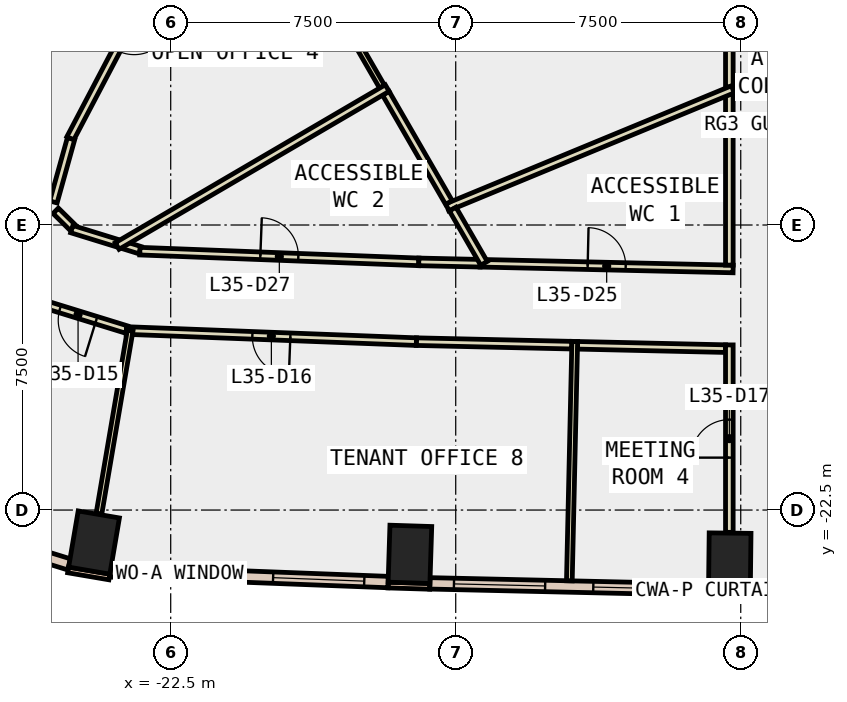
"""IFC4 building model, lengths in metres.
Left out: names, types, materials, properties, quantities, classifications, styles, units other than length and angle.
Written with IfcOpenShell. Run it as: python <this file> out.ifc"""

import sys

from ifc_helpers import new_model, si_unit, direction, frame, frame_2d, origin, origin_2d, place, context, subcontext, project, spatial, rectangle, extrude, element, fill, save


model = new_model("IFC4")
c1 = context("Model", 3, precision=1e-05, world=origin(), true_north=direction((0.0, 1.0)))
c2 = subcontext(c1, "Body", "Model", "MODEL_VIEW")
j1 = project(units=[si_unit("LENGTHUNIT", "METRE"), si_unit("PLANEANGLEUNIT", "RADIAN")], contexts=[c1])
p1 = place(None, origin())
s1 = spatial("IfcSite", under=j1, at=p1, CompositionType="ELEMENT")
p2 = place(p1, origin())
s2 = spatial("IfcBuilding", under=s1, at=p2, CompositionType="ELEMENT")
p3 = place(p2, frame((0.0, 0.0, 159.2)))
s3 = spatial("IfcBuildingStorey", under=s2, at=p3, CompositionType="ELEMENT", Elevation=159.2)
for number, where, z_axis, x_axis in (
    (1, (-24.518, -23.355, -0.4), (0.0, 0.0, 1.0), (-0.986, 0.168, 0.0)),
    (2, (-16.205, -23.666, -0.4), (0.0, 0.0, 1.0), (-0.999, 0.032, 0.0)),
    (3, (-7.789, -23.857, -0.4), (0.0, 0.0, 1.0), (-1.0, 0.012, 0.0)),
):
    element("IfcColumn", number, at=place(p3, frame(where, z_axis=z_axis, x_axis=x_axis)), inside=s3, PredefinedType="COLUMN", context=c2, shape_type="SweptSolid", body=[
        extrude(rectangle(XDim=1.1, YDim=1.5, at=origin_2d()), origin(), (0.0, 0.0, 1.0), 4.2),
    ])
p4 = place(p3, frame((-25.199, -24.076, 0.0), z_axis=(0.0, 0.0, 1.0), x_axis=(0.985763338892, -0.168138751323, 0.0)))
e4 = element("IfcWall", 4, at=p4, inside=s3, PredefinedType="STANDARD", context=c2, shape_type="SweptSolid", body=[
    extrude(rectangle(XDim=1.101, YDim=0.15, at=frame_2d((0.55, 0.0))), origin(), (0.0, 0.0, 1.0), 3.8),
])
p5 = place(p3, frame((-16.781, -24.474, 0.0), z_axis=(0.0, 0.0, 1.0), x_axis=(0.999523702549, -0.030860460829, 0.0)))
e5 = element("IfcWall", 5, at=p5, inside=s3, PredefinedType="STANDARD", context=c2, shape_type="SweptSolid", body=[
    extrude(rectangle(XDim=1.1, YDim=0.15, at=frame_2d((0.55, 0.0))), origin(), (0.0, 0.0, 1.0), 3.8),
])
p6 = place(p3, frame((-8.349, -24.676, 0.0), z_axis=(0.0, 0.0, 1.0), x_axis=(0.999940879068, -0.010873746799, 0.0)))
e6 = element("IfcWall", 6, at=p6, inside=s3, PredefinedType="STANDARD", context=c2, shape_type="SweptSolid", body=[
    extrude(rectangle(XDim=1.1, YDim=0.15, at=frame_2d((0.55, 0.0))), origin(), (0.0, 0.0, 1.0), 3.8),
])
p7 = place(p3, frame((-24.09, -24.114, 0.0), z_axis=(0.0, 0.0, 1.0), x_axis=(0.999262356942, -0.038402369711, 0.0)))
e7 = element("IfcWall", 7, at=p7, inside=s3, PredefinedType="STANDARD", context=c2, shape_type="SweptSolid", body=[
    extrude(rectangle(XDim=7.317, YDim=0.3, at=frame_2d((3.659, 0.0))), origin(), (0.0, 0.0, 1.0), 3.8),
])
p8 = place(p7, frame((0.629, 0.0, 0.9)))
e8 = element("IfcOpeningElement", 8, at=p8, cuts=e7, PredefinedType="OPENING", context=c2, shape_type="SweptSolid", body=[
    extrude(rectangle(XDim=2.4, YDim=2.6, at=frame_2d((1.2, 1.3))), frame((0.0, 0.16, 0.0), z_axis=(0.0, -1.0, 0.0), x_axis=(1.0, 0.0, 0.0)), (0.0, 0.0, 1.0), 0.32),
])
p9 = place(p7, frame((4.288, 0.0, 0.9)))
e9 = element("IfcOpeningElement", 9, at=p9, cuts=e7, PredefinedType="OPENING", context=c2, shape_type="SweptSolid", body=[
    extrude(rectangle(XDim=2.4, YDim=2.6, at=frame_2d((1.2, 1.3))), frame((0.0, 0.16, 0.0), z_axis=(0.0, -1.0, 0.0), x_axis=(1.0, 0.0, 0.0)), (0.0, 0.0, 1.0), 0.32),
])
p10 = place(p3, frame((-15.68, -24.429, 0.0), z_axis=(0.0, 0.0, 1.0), x_axis=(0.999743825009, -0.022633699594, 0.0)))
e10 = element("IfcWall", 10, at=p10, inside=s3, PredefinedType="STANDARD", context=c2, shape_type="SweptSolid", body=[
    extrude(rectangle(XDim=7.335, YDim=0.3, at=frame_2d((3.667, 0.0))), origin(), (0.0, 0.0, 1.0), 3.8),
])
p11 = place(p10, frame((0.634, 0.0, 0.9)))
e11 = element("IfcOpeningElement", 11, at=p11, cuts=e10, PredefinedType="OPENING", context=c2, shape_type="SweptSolid", body=[
    extrude(rectangle(XDim=2.4, YDim=2.6, at=frame_2d((1.2, 1.3))), frame((0.0, 0.16, 0.0), z_axis=(0.0, -1.0, 0.0), x_axis=(1.0, 0.0, 0.0)), (0.0, 0.0, 1.0), 0.32),
])
p12 = place(p10, frame((4.301, 0.0, 0.9)))
e12 = element("IfcOpeningElement", 12, at=p12, cuts=e10, PredefinedType="OPENING", context=c2, shape_type="SweptSolid", body=[
    extrude(rectangle(XDim=2.4, YDim=2.6, at=frame_2d((1.2, 1.3))), frame((0.0, 0.16, 0.0), z_axis=(0.0, -1.0, 0.0), x_axis=(1.0, 0.0, 0.0)), (0.0, 0.0, 1.0), 0.32),
])
p13 = place(p3, frame((-28.929, -22.77, 0.0), z_axis=(0.0, 0.0, 1.0), x_axis=(0.955473661147, -0.295076401723, 0.0)))
e13 = element("IfcWall", 13, at=p13, inside=s3, PredefinedType="STANDARD", context=c2, shape_type="SweptSolid", body=[
    extrude(rectangle(XDim=3.931, YDim=0.3, at=frame_2d((1.965, 0.0))), origin(), (0.0, 0.0, 1.0), 3.8),
])
p14 = place(p13, frame((1.266, 0.0, 0.9)))
e14 = element("IfcOpeningElement", 14, at=p14, cuts=e13, PredefinedType="OPENING", context=c2, shape_type="SweptSolid", body=[
    extrude(rectangle(XDim=1.4, YDim=2.6, at=frame_2d((0.7, 1.3))), frame((0.0, 0.16, 0.0), z_axis=(0.0, -1.0, 0.0), x_axis=(1.0, 0.0, 0.0)), (0.0, 0.0, 1.0), 0.32),
])
p15 = place(p3, frame((-14.356, -16.006, 0.0), z_axis=(0.0, 0.0, 1.0), x_axis=(0.999743177933, -0.022662263286, 0.0)))
e15 = element("IfcWall", 15, at=p15, inside=s3, PredefinedType="PARTITIONING", context=c2, shape_type="SweptSolid", body=[
    extrude(rectangle(XDim=6.658, YDim=0.2, at=frame_2d((3.329, 0.0))), origin(), (0.0, 0.0, 1.0), 3.8),
])
p16 = place(p15, frame((2.829, 0.0, 0.0)))
e16 = element("IfcOpeningElement", 16, at=p16, cuts=e15, PredefinedType="OPENING", context=c2, shape_type="SweptSolid", body=[
    extrude(rectangle(XDim=1.0, YDim=2.1, at=frame_2d((0.5, 1.05))), frame((0.0, 0.11, 0.0), z_axis=(0.0, -1.0, 0.0), x_axis=(1.0, 0.0, 0.0)), (0.0, 0.0, 1.0), 0.22),
])
p17 = place(p3, frame((-22.241, -7.198, 0.0), z_axis=(0.0, 0.0, 1.0), x_axis=(-0.465089990515, -0.885263407536, 0.0)))
e17 = element("IfcWall", 17, at=p17, inside=s3, PredefinedType="PARTITIONING", context=c2, shape_type="SweptSolid", body=[
    extrude(rectangle(XDim=6.24, YDim=0.2, at=frame_2d((3.12, 0.0))), origin(), (0.0, 0.0, 1.0), 3.8),
])
p18 = place(p17, frame((2.62, 0.0, 0.0)))
e18 = element("IfcOpeningElement", 18, at=p18, cuts=e17, PredefinedType="OPENING", context=c2, shape_type="SweptSolid", body=[
    extrude(rectangle(XDim=1.0, YDim=2.1, at=frame_2d((0.5, 1.05))), frame((0.0, 0.11, 0.0), z_axis=(0.0, -1.0, 0.0), x_axis=(1.0, 0.0, 0.0)), (0.0, 0.0, 1.0), 0.22),
])
p19 = place(p3, frame((-25.123, -12.73, 0.0), z_axis=(0.0, 0.0, 1.0), x_axis=(-0.268139825244, -0.963380005044, 0.0)))
e19 = element("IfcWall", 19, at=p19, inside=s3, PredefinedType="PARTITIONING", context=c2, shape_type="SweptSolid", body=[
    extrude(rectangle(XDim=1.726, YDim=0.2, at=frame_2d((0.863, 0.0))), origin(), (0.0, 0.0, 1.0), 3.8),
])
p20 = place(p3, frame((-25.526, -14.626, 0.0), z_axis=(0.0, 0.0, 1.0), x_axis=(0.711758647644, -0.702424108003, 0.0)))
e20 = element("IfcWall", 20, at=p20, inside=s3, PredefinedType="PARTITIONING", context=c2, shape_type="SweptSolid", body=[
    extrude(rectangle(XDim=0.628, YDim=0.2, at=frame_2d((0.314, 0.0))), origin(), (0.0, 0.0, 1.0), 3.8),
])
p21 = place(p3, frame((-25.103, -15.108, 0.0), z_axis=(0.0, 0.0, 1.0), x_axis=(0.955420813731, -0.295247470251, 0.0)))
e21 = element("IfcWall", 21, at=p21, inside=s3, PredefinedType="PARTITIONING", context=c2, shape_type="SweptSolid", body=[
    extrude(rectangle(XDim=1.24, YDim=0.2, at=frame_2d((0.62, 0.0))), origin(), (0.0, 0.0, 1.0), 3.8),
])
p22 = place(p3, frame((-23.727, -15.532, 0.0), z_axis=(0.0, 0.0, 1.0), x_axis=(0.955237350621, -0.295840504289, 0.0)))
e22 = element("IfcWall", 22, at=p22, inside=s3, PredefinedType="PARTITIONING", context=c2, shape_type="SweptSolid", body=[
    extrude(rectangle(XDim=0.44, YDim=0.2, at=frame_2d((0.22, 0.0))), origin(), (0.0, 0.0, 1.0), 3.8),
])
p23 = place(p3, frame((-23.311, -15.688, 0.0), z_axis=(0.0, 0.0, 1.0), x_axis=(0.999262695969, -0.038393546916, 0.0)))
e23 = element("IfcWall", 23, at=p23, inside=s3, PredefinedType="PARTITIONING", context=c2, shape_type="SweptSolid", body=[
    extrude(rectangle(XDim=7.344, YDim=0.2, at=frame_2d((3.672, 0.0))), origin(), (0.0, 0.0, 1.0), 3.8),
])
p24 = place(p23, frame((3.172, 0.0, 0.0)))
e24 = element("IfcOpeningElement", 24, at=p24, cuts=e23, PredefinedType="OPENING", context=c2, shape_type="SweptSolid", body=[
    extrude(rectangle(XDim=1.0, YDim=2.1, at=frame_2d((0.5, 1.05))), frame((0.0, 0.11, 0.0), z_axis=(0.0, -1.0, 0.0), x_axis=(1.0, 0.0, 0.0)), (0.0, 0.0, 1.0), 0.22),
])
p25 = place(p3, frame((-15.972, -15.97, 0.0), z_axis=(0.0, 0.0, 1.0), x_axis=(0.999750111735, -0.022354285623, 0.0)))
e25 = element("IfcWall", 25, at=p25, inside=s3, PredefinedType="PARTITIONING", context=c2, shape_type="SweptSolid", body=[
    extrude(rectangle(XDim=1.616, YDim=0.2, at=frame_2d((0.808, 0.0))), origin(), (0.0, 0.0, 1.0), 3.8),
])
p26 = place(p3, frame((-27.106, -11.944, 0.0), z_axis=(0.0, 0.0, 1.0), x_axis=(0.464985599417, 0.885318243534, 0.0)))
e26 = element("IfcWall", 26, at=p26, inside=s3, PredefinedType="PARTITIONING", context=c2, shape_type="SweptSolid", body=[
    extrude(rectangle(XDim=6.402, YDim=0.2, at=frame_2d((3.201, 0.0))), origin(), (0.0, 0.0, 1.0), 3.8),
])
p27 = place(p26, frame((2.776, 0.0, 0.0)))
e27 = element("IfcOpeningElement", 27, at=p27, cuts=e26, PredefinedType="OPENING", context=c2, shape_type="SweptSolid", body=[
    extrude(rectangle(XDim=1.0, YDim=2.1, at=frame_2d((0.5, 1.05))), frame((0.0, 0.11, 0.0), z_axis=(0.0, -1.0, 0.0), x_axis=(1.0, 0.0, 0.0)), (0.0, 0.0, 1.0), 0.22),
])
p28 = place(p3, frame((-23.663, -17.75, 0.0), z_axis=(0.0, 0.0, 1.0), x_axis=(-0.955509582123, 0.294960062501, 0.0)))
e28 = element("IfcWall", 28, at=p28, inside=s3, PredefinedType="PARTITIONING", context=c2, shape_type="SweptSolid", body=[
    extrude(rectangle(XDim=2.668, YDim=0.2, at=frame_2d((1.334, 0.0))), origin(), (0.0, 0.0, 1.0), 3.8),
])
p29 = place(p28, frame((0.834, 0.0, 0.0)))
e29 = element("IfcOpeningElement", 29, at=p29, cuts=e28, PredefinedType="OPENING", context=c2, shape_type="SweptSolid", body=[
    extrude(rectangle(XDim=1.0, YDim=2.1, at=frame_2d((0.5, 1.05))), frame((0.0, 0.11, 0.0), z_axis=(0.0, -1.0, 0.0), x_axis=(1.0, 0.0, 0.0)), (0.0, 0.0, 1.0), 0.22),
])
p30 = place(p3, frame((-11.945, -18.162, 0.0), z_axis=(0.0, 0.0, 1.0), x_axis=(-0.999741589065, 0.022732247877, 0.0)))
e30 = element("IfcWall", 30, at=p30, inside=s3, PredefinedType="PARTITIONING", context=c2, shape_type="SweptSolid", body=[
    extrude(rectangle(XDim=4.092, YDim=0.2, at=frame_2d((2.046, 0.0))), origin(), (0.0, 0.0, 1.0), 3.8),
])
p31 = place(p3, frame((-16.036, -18.069, 0.0), z_axis=(0.0, 0.0, 1.0), x_axis=(-0.999262637786, 0.038395061202, 0.0)))
e31 = element("IfcWall", 31, at=p31, inside=s3, PredefinedType="PARTITIONING", context=c2, shape_type="SweptSolid", body=[
    extrude(rectangle(XDim=7.637, YDim=0.2, at=frame_2d((3.818, 0.0))), origin(), (0.0, 0.0, 1.0), 3.8),
])
p32 = place(p31, frame((3.318, 0.0, 0.0)))
e32 = element("IfcOpeningElement", 32, at=p32, cuts=e31, PredefinedType="OPENING", context=c2, shape_type="SweptSolid", body=[
    extrude(rectangle(XDim=1.0, YDim=2.1, at=frame_2d((0.5, 1.05))), frame((0.0, 0.11, 0.0), z_axis=(0.0, -1.0, 0.0), x_axis=(1.0, 0.0, 0.0)), (0.0, 0.0, 1.0), 0.22),
])
p33 = place(p3, frame((-7.9, -18.253, 0.0), z_axis=(0.0, 0.0, 1.0), x_axis=(-0.999745510411, 0.022559131487, 0.0)))
e33 = element("IfcWall", 33, at=p33, inside=s3, PredefinedType="PARTITIONING", context=c2, shape_type="SweptSolid", body=[
    extrude(rectangle(XDim=3.896, YDim=0.2, at=frame_2d((1.948, 0.0))), origin(), (0.0, 0.0, 1.0), 3.8),
])
p34 = place(p3, frame((-7.8, -11.368, 0.0), z_axis=(0.0, 0.0, 1.0), x_axis=(0.0, 1.0, 0.0)))
e34 = element("IfcWall", 34, at=p34, inside=s3, PredefinedType="PARTITIONING", context=c2, shape_type="SweptSolid", body=[
    extrude(rectangle(XDim=1.969, YDim=0.2, at=frame_2d((0.984, 0.0))), origin(), (0.0, 0.0, 1.0), 3.8),
])
p35 = place(p3, frame((-7.8, -16.055, 0.0), z_axis=(0.0, 0.0, 1.0), x_axis=(0.0, 1.0, 0.0)))
e35 = element("IfcWall", 35, at=p35, inside=s3, PredefinedType="PARTITIONING", context=c2, shape_type="SweptSolid", body=[
    extrude(rectangle(XDim=4.487, YDim=0.2, at=frame_2d((2.243, 0.0))), origin(), (0.0, 0.0, 1.0), 3.8),
])
p36 = place(p3, frame((-7.8, -23.087, 0.0), z_axis=(0.0, 0.0, 1.0), x_axis=(0.0, 1.0, 0.0)))
e36 = element("IfcWall", 36, at=p36, inside=s3, PredefinedType="PARTITIONING", context=c2, shape_type="SweptSolid", body=[
    extrude(rectangle(XDim=4.932, YDim=0.2, at=frame_2d((2.466, 0.0))), origin(), (0.0, 0.0, 1.0), 3.8),
])
p37 = place(p36, frame((1.966, 0.0, 0.0)))
e37 = element("IfcOpeningElement", 37, at=p37, cuts=e36, PredefinedType="OPENING", context=c2, shape_type="SweptSolid", body=[
    extrude(rectangle(XDim=1.0, YDim=2.1, at=frame_2d((0.5, 1.05))), frame((0.0, 0.11, 0.0), z_axis=(0.0, -1.0, 0.0), x_axis=(1.0, 0.0, 0.0)), (0.0, 0.0, 1.0), 0.22),
])
p38 = place(p3, frame((-7.708, -11.43, 0.0), z_axis=(0.0, 0.0, 1.0), x_axis=(-0.924285151797, -0.381702709144, 0.0)))
e38 = element("IfcWall", 38, at=p38, inside=s3, PredefinedType="PARTITIONING", context=c2, shape_type="SweptSolid", body=[
    extrude(rectangle(XDim=8.129, YDim=0.2, at=frame_2d((4.065, 0.0))), origin(), (0.0, 0.0, 1.0), 3.8),
])
p39 = place(p3, frame((-16.939, -11.36, 0.0), z_axis=(0.0, 0.0, 1.0), x_axis=(-0.500053473428, 0.865994528685, 0.0)))
e39 = element("IfcWall", 39, at=p39, inside=s3, PredefinedType="PARTITIONING", context=c2, shape_type="SweptSolid", body=[
    extrude(rectangle(XDim=7.895, YDim=0.15, at=frame_2d((3.948, 0.0))), origin(), (0.0, 0.0, 1.0), 3.8),
])
p40 = place(p3, frame((-15.18, -14.408, 0.0), z_axis=(0.0, 0.0, 1.0), x_axis=(-0.499968694491, 0.866043477274, 0.0)))
e40 = element("IfcWall", 40, at=p40, inside=s3, PredefinedType="PARTITIONING", context=c2, shape_type="SweptSolid", body=[
    extrude(rectangle(XDim=3.319, YDim=0.2, at=frame_2d((1.659, 0.0))), origin(), (0.0, 0.0, 1.0), 3.8),
])
p41 = place(p3, frame((-14.256, -16.009, 0.0), z_axis=(0.0, 0.0, 1.0), x_axis=(-0.499786551025, 0.86614860354, 0.0)))
e41 = element("IfcWall", 41, at=p41, inside=s3, PredefinedType="PARTITIONING", context=c2, shape_type="SweptSolid", body=[
    extrude(rectangle(XDim=1.649, YDim=0.2, at=frame_2d((0.824, 0.0))), origin(), (0.0, 0.0, 1.0), 3.8),
])
p42 = place(p3, frame((-16.803, -11.397, 0.0), z_axis=(0.0, 0.0, 1.0), x_axis=(-0.863203941699, -0.504855380318, 0.0)))
e42 = element("IfcWall", 42, at=p42, inside=s3, PredefinedType="PARTITIONING", context=c2, shape_type="SweptSolid", body=[
    extrude(rectangle(XDim=8.232, YDim=0.2, at=frame_2d((4.116, 0.0))), origin(), (0.0, 0.0, 1.0), 3.8),
])
p43 = place(p3, frame((-23.567, -17.779, 0.0), z_axis=(0.0, 0.0, 1.0), x_axis=(-0.168027663896, -0.985782280306, 0.0)))
e43 = element("IfcWall", 43, at=p43, inside=s3, PredefinedType="PARTITIONING", context=c2, shape_type="SweptSolid", body=[
    extrude(rectangle(XDim=4.886, YDim=0.15, at=frame_2d((2.443, 0.0))), origin(), (0.0, 0.0, 1.0), 3.8),
])
p44 = place(p3, frame((-11.868, -18.063, 0.0), z_axis=(0.0, 0.0, 1.0), x_axis=(-0.022551528502, -0.999745681942, 0.0)))
e44 = element("IfcWall", 44, at=p44, inside=s3, PredefinedType="PARTITIONING", context=c2, shape_type="SweptSolid", body=[
    extrude(rectangle(XDim=6.301, YDim=0.15, at=frame_2d((3.15, 0.0))), origin(), (0.0, 0.0, 1.0), 3.8),
])
p45 = place(p8, origin())
e45 = element("IfcWindow", 45, at=p45, inside=s3, PartitioningType="SINGLE_PANEL", PredefinedType="WINDOW", context=c2, shape_type="SweptSolid", body=[
    extrude(rectangle(XDim=2.4, YDim=2.6, at=frame_2d((1.2, 1.3))), frame((0.0, 0.03, 0.0), z_axis=(0.0, -1.0, 0.0), x_axis=(1.0, 0.0, 0.0)), (0.0, 0.0, 1.0), 0.06),
])
fill(e8, e45)
p46 = place(p9, origin())
e46 = element("IfcWindow", 46, at=p46, inside=s3, PartitioningType="SINGLE_PANEL", PredefinedType="WINDOW", context=c2, shape_type="SweptSolid", body=[
    extrude(rectangle(XDim=2.4, YDim=2.6, at=frame_2d((1.2, 1.3))), frame((0.0, 0.03, 0.0), z_axis=(0.0, -1.0, 0.0), x_axis=(1.0, 0.0, 0.0)), (0.0, 0.0, 1.0), 0.06),
])
fill(e9, e46)
p47 = place(p11, origin())
e47 = element("IfcWindow", 47, at=p47, inside=s3, PartitioningType="SINGLE_PANEL", PredefinedType="WINDOW", context=c2, shape_type="SweptSolid", body=[
    extrude(rectangle(XDim=2.4, YDim=2.6, at=frame_2d((1.2, 1.3))), frame((0.0, 0.03, 0.0), z_axis=(0.0, -1.0, 0.0), x_axis=(1.0, 0.0, 0.0)), (0.0, 0.0, 1.0), 0.06),
])
fill(e11, e47)
p48 = place(p12, origin())
e48 = element("IfcWindow", 48, at=p48, inside=s3, PartitioningType="SINGLE_PANEL", PredefinedType="WINDOW", context=c2, shape_type="SweptSolid", body=[
    extrude(rectangle(XDim=2.4, YDim=2.6, at=frame_2d((1.2, 1.3))), frame((0.0, 0.03, 0.0), z_axis=(0.0, -1.0, 0.0), x_axis=(1.0, 0.0, 0.0)), (0.0, 0.0, 1.0), 0.06),
])
fill(e12, e48)
p49 = place(p29, origin())
e49 = element("IfcDoor", 49, at=p49, inside=s3, OperationType="SINGLE_SWING_LEFT", PredefinedType="DOOR", context=c2, shape_type="SweptSolid", body=[
    extrude(rectangle(XDim=1.0, YDim=2.1, at=frame_2d((0.5, 1.05))), frame((0.0, 0.025, 0.0), z_axis=(0.0, -1.0, 0.0), x_axis=(1.0, 0.0, 0.0)), (0.0, 0.0, 1.0), 0.05),
])
fill(e29, e49)
p50 = place(p32, origin())
e50 = element("IfcDoor", 50, at=p50, inside=s3, OperationType="SINGLE_SWING_RIGHT", PredefinedType="DOOR", context=c2, shape_type="SweptSolid", body=[
    extrude(rectangle(XDim=1.0, YDim=2.1, at=frame_2d((0.5, 1.05))), frame((0.0, 0.025, 0.0), z_axis=(0.0, -1.0, 0.0), x_axis=(1.0, 0.0, 0.0)), (0.0, 0.0, 1.0), 0.05),
])
fill(e32, e50)
p51 = place(p37, origin())
e51 = element("IfcDoor", 51, at=p51, inside=s3, OperationType="SINGLE_SWING_LEFT", PredefinedType="DOOR", context=c2, shape_type="SweptSolid", body=[
    extrude(rectangle(XDim=1.0, YDim=2.1, at=frame_2d((0.5, 1.05))), frame((0.0, 0.025, 0.0), z_axis=(0.0, -1.0, 0.0), x_axis=(1.0, 0.0, 0.0)), (0.0, 0.0, 1.0), 0.05),
])
fill(e37, e51)
p52 = place(p16, origin())
e52 = element("IfcDoor", 52, at=p52, inside=s3, OperationType="SINGLE_SWING_LEFT", PredefinedType="DOOR", context=c2, shape_type="SweptSolid", body=[
    extrude(rectangle(XDim=1.0, YDim=2.1, at=frame_2d((0.5, 1.05))), frame((0.0, 0.025, 0.0), z_axis=(0.0, -1.0, 0.0), x_axis=(1.0, 0.0, 0.0)), (0.0, 0.0, 1.0), 0.05),
])
fill(e16, e52)
p53 = place(p24, origin())
e53 = element("IfcDoor", 53, at=p53, inside=s3, OperationType="SINGLE_SWING_RIGHT", PredefinedType="DOOR", context=c2, shape_type="SweptSolid", body=[
    extrude(rectangle(XDim=1.0, YDim=2.1, at=frame_2d((0.5, 1.05))), frame((0.0, 0.025, 0.0), z_axis=(0.0, -1.0, 0.0), x_axis=(1.0, 0.0, 0.0)), (0.0, 0.0, 1.0), 0.05),
])
fill(e24, e53)
save(model, sys.argv[1])
